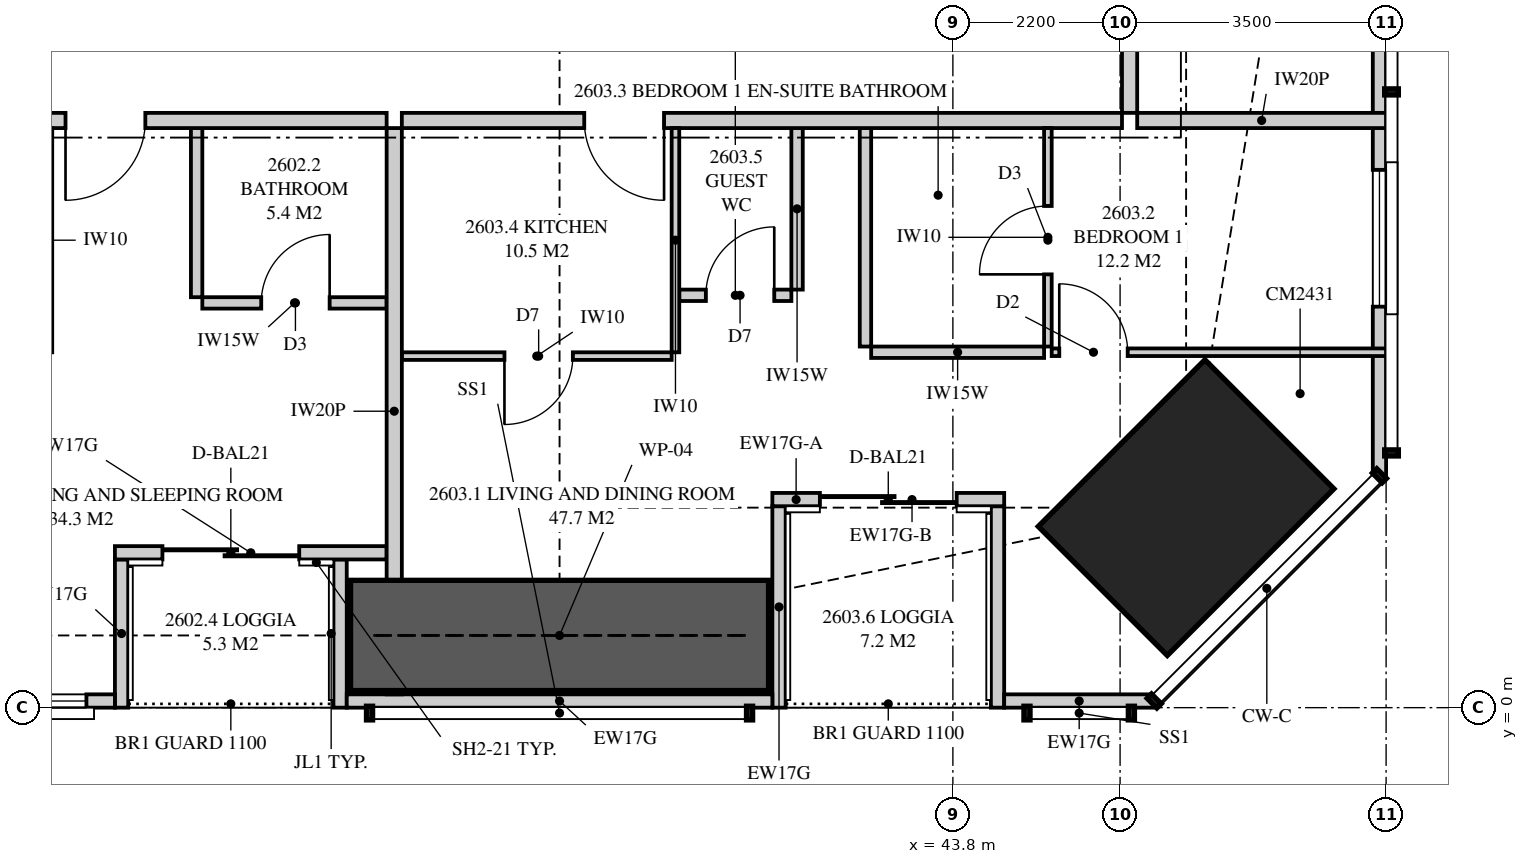
"""IFC4 building model, lengths in metres.
Left out: names, types, materials, properties, quantities, classifications, styles, units other than length and angle.
Written with IfcOpenShell. Run it as: python <this file> out.ifc"""

import sys

from ifc_helpers import new_model, si_unit, direction, frame, frame_2d, origin, origin_2d, place, context, subcontext, project, spatial, polyline, rectangle, outline, extrude, element, fill, save


model = new_model("IFC4")
c1 = context("Model", 3, precision=1e-05, world=origin(), true_north=direction((0.0, 1.0)))
c2 = subcontext(c1, "Body", "Model", "MODEL_VIEW")
j1 = project(units=[si_unit("LENGTHUNIT", "METRE"), si_unit("PLANEANGLEUNIT", "RADIAN")], contexts=[c1])
p1 = place(None, origin())
s1 = spatial("IfcSite", under=j1, at=p1, CompositionType="ELEMENT")
p2 = place(p1, origin())
s2 = spatial("IfcBuilding", under=s1, at=p2, CompositionType="ELEMENT")
p3 = place(p2, frame((0.0, 0.0, 98.15)))
s3 = spatial("IfcBuildingStorey", under=s2, at=p3, CompositionType="ELEMENT", Elevation=98.15)
p4 = place(p3, frame((46.869, 2.631, 0.0), z_axis=(0.0, 0.0, 1.0), x_axis=(-0.707106781187, 0.707106781187, 0.0)))
e1 = element("IfcColumn", 1, at=p4, inside=s3, PredefinedType="COLUMN", context=c2, shape_type="SweptSolid", body=[
    extrude(rectangle(XDim=2.4, YDim=3.1, at=origin_2d()), origin(), (0.0, 0.0, 1.0), 3.35),
])
p5 = place(p3, frame((24.875, 0.087, 0.0), z_axis=(0.0, 0.0, 1.0), x_axis=(1.0, 0.0, 0.0)))
e2 = element("IfcWall", 2, at=p5, inside=s3, PredefinedType="SOLIDWALL", context=c2, shape_type="SweptSolid", body=[
    extrude(rectangle(XDim=7.9, YDim=0.175, at=frame_2d((3.95, 0.0))), origin(), (0.0, 0.0, 1.0), 2.15),
])
p6 = place(p5, frame((5.725, 0.0, 0.4)))
e3 = element("IfcOpeningElement", 3, at=p6, cuts=e2, PredefinedType="OPENING", context=c2, shape_type="SweptSolid", body=[
    extrude(rectangle(XDim=1.8, YDim=1.7, at=frame_2d((0.9, 0.85))), frame((0.0, 0.097, 0.0), z_axis=(0.0, -1.0, 0.0), x_axis=(1.0, 0.0, 0.0)), (0.0, 0.0, 1.0), 0.195),
])
p7 = place(p3, frame((35.825, 0.087, 0.0), z_axis=(0.0, 0.0, 1.0), x_axis=(1.0, 0.0, 0.0)))
e4 = element("IfcWall", 4, at=p7, inside=s3, PredefinedType="SOLIDWALL", context=c2, shape_type="SweptSolid", body=[
    extrude(outline(polyline([(0.0, 0.0), (5.6, 0.0), (5.6, 3.11), (3.003, 3.11), (3.003, 2.15), (2.958, 2.15), (2.958, 3.11), (2.8, 3.11), (2.8, 2.15), (0.0, 2.15), (0.0, 0.0)])), frame((0.0, 0.087, 0.0), z_axis=(0.0, -1.0, 0.0), x_axis=(1.0, 0.0, 0.0)), (0.0, 0.0, 1.0), 0.175),
])
p8 = place(p3, frame((44.475, 0.087, 0.0), z_axis=(0.0, 0.0, 1.0), x_axis=(1.0, 0.0, 0.0)))
e5 = element("IfcWall", 5, at=p8, inside=s3, PredefinedType="SOLIDWALL", context=c2, shape_type="SweptSolid", body=[
    extrude(rectangle(XDim=1.974, YDim=0.175, at=frame_2d((0.987, 0.0))), origin(), (0.0, 0.0, 1.0), 3.11),
])
p9 = place(p3, frame((32.775, 2.038, 0.0), z_axis=(0.0, 0.0, 1.0), x_axis=(1.0, 0.0, 0.0)))
e6 = element("IfcWall", 6, at=p9, inside=s3, PredefinedType="SOLIDWALL", context=c2, shape_type="SweptSolid", body=[
    extrude(rectangle(XDim=3.575, YDim=0.175, at=frame_2d((1.788, 0.0))), origin(), (0.0, 0.0, 1.0), 3.11),
])
p10 = place(p9, frame((0.625, 0.0, 0.0)))
e7 = element("IfcOpeningElement", 7, at=p10, cuts=e6, PredefinedType="OPENING", context=c2, shape_type="SweptSolid", body=[
    extrude(rectangle(XDim=1.8, YDim=2.1, at=frame_2d((0.9, 1.05))), frame((0.0, 0.097, 0.0), z_axis=(0.0, -1.0, 0.0), x_axis=(1.0, 0.0, 0.0)), (0.0, 0.0, 1.0), 0.195),
])
for number, where, z_axis, x_axis in (
    (8, (32.863, 0.0, 0.0), (0.0, 0.0, 1.0), (0.0, 1.0, 0.0)),
    (9, (35.738, 0.0, 0.0), (0.0, 0.0, 1.0), (0.0, 1.0, 0.0)),
):
    element("IfcWall", number, at=place(p3, frame(where, z_axis=z_axis, x_axis=x_axis)), inside=s3, PredefinedType="SOLIDWALL", context=c2, shape_type="SweptSolid", body=[
        extrude(outline(polyline([(0.0, 0.0), (1.95, 0.0), (1.95, 3.11), (1.75, 3.11), (1.75, 2.15), (0.15, 2.15), (0.15, 3.11), (0.0, 3.11), (0.0, 0.0)])), frame((0.0, 0.087, 0.0), z_axis=(0.0, -1.0, 0.0), x_axis=(1.0, 0.0, 0.0)), (0.0, 0.0, 1.0), 0.175),
    ])
p11 = place(p3, frame((41.425, 2.738, 0.0), z_axis=(0.0, 0.0, 1.0), x_axis=(1.0, 0.0, 0.0)))
e10 = element("IfcWall", 10, at=p11, inside=s3, PredefinedType="SOLIDWALL", context=c2, shape_type="SweptSolid", body=[
    extrude(rectangle(XDim=0.625, YDim=0.175, at=frame_2d((0.312, 0.0))), origin(), (0.0, 0.0, 1.0), 2.51),
])
p12 = place(p3, frame((42.05, 2.738, 0.0), z_axis=(0.0, 0.0, 1.0), x_axis=(1.0, 0.0, 0.0)))
e11 = element("IfcWall", 11, at=p12, inside=s3, PredefinedType="SOLIDWALL", context=c2, shape_type="SweptSolid", body=[
    extrude(rectangle(XDim=2.425, YDim=0.175, at=frame_2d((1.212, 0.0))), origin(), (0.0, 0.0, 1.0), 2.15),
])
p13 = place(p12, origin())
e12 = element("IfcOpeningElement", 12, at=p13, cuts=e11, PredefinedType="OPENING", context=c2, shape_type="SweptSolid", body=[
    extrude(rectangle(XDim=1.8, YDim=2.1, at=frame_2d((0.9, 1.05))), frame((0.0, 0.097, 0.0), z_axis=(0.0, -1.0, 0.0), x_axis=(1.0, 0.0, 0.0)), (0.0, 0.0, 1.0), 0.195),
])
p14 = place(p3, frame((41.512, 0.0, 0.0), z_axis=(0.0, 0.0, 1.0), x_axis=(0.0, 1.0, 0.0)))
e13 = element("IfcWall", 13, at=p14, inside=s3, PredefinedType="SOLIDWALL", context=c2, shape_type="SweptSolid", body=[
    extrude(outline(polyline([(0.0, 0.0), (2.65, 0.0), (2.65, 2.51), (2.373, 2.51), (2.373, 2.15), (0.705, 2.15), (0.705, 3.11), (0.0, 3.11), (0.0, 0.0)])), frame((0.0, 0.087, 0.0), z_axis=(0.0, -1.0, 0.0), x_axis=(1.0, 0.0, 0.0)), (0.0, 0.0, 1.0), 0.175),
])
p15 = place(p3, frame((44.387, 0.0, 0.0), z_axis=(0.0, 0.0, 1.0), x_axis=(0.0, 1.0, 0.0)))
e14 = element("IfcWall", 14, at=p15, inside=s3, PredefinedType="SOLIDWALL", context=c2, shape_type="SweptSolid", body=[
    extrude(outline(polyline([(0.0, 0.0), (2.65, 0.0), (2.65, 2.15), (1.291, 2.15), (1.291, 3.11), (0.0, 3.11), (0.0, 0.0)])), frame((0.0, 0.087, 0.0), z_axis=(0.0, -1.0, 0.0), x_axis=(1.0, 0.0, 0.0)), (0.0, 0.0, 1.0), 0.175),
])
p16 = place(p3, frame((49.413, 3.051, 0.0), z_axis=(0.0, 0.0, 1.0), x_axis=(0.0, 1.0, 0.0)))
e15 = element("IfcWall", 15, at=p16, inside=s3, PredefinedType="SOLIDWALL", context=c2, shape_type="SweptSolid", body=[
    extrude(outline(polyline([(0.0, 0.0), (31.897, 0.0), (31.897, 3.11), (22.167, 3.11), (22.167, 2.15), (22.074, 2.15), (22.074, 3.11), (21.949, 3.11), (21.949, 2.15), (9.949, 2.15), (9.949, 3.11), (9.823, 3.11), (9.823, 2.15), (9.73, 2.15), (9.73, 3.11), (0.0, 3.11), (0.0, 0.0)])), frame((0.0, 0.087, 0.0), z_axis=(0.0, -1.0, 0.0), x_axis=(1.0, 0.0, 0.0)), (0.0, 0.0, 1.0), 0.175),
])
p17 = place(p16, frame((2.224, 0.0, 0.4)))
e16 = element("IfcOpeningElement", 16, at=p17, cuts=e15, PredefinedType="OPENING", context=c2, shape_type="SweptSolid", body=[
    extrude(rectangle(XDim=1.8, YDim=1.7, at=frame_2d((0.9, 0.85))), frame((0.0, 0.097, 0.0), z_axis=(0.0, -1.0, 0.0), x_axis=(1.0, 0.0, 0.0)), (0.0, 0.0, 1.0), 0.195),
])
p18 = place(p16, frame((14.849, 0.0, 0.4)))
e17 = element("IfcOpeningElement", 17, at=p18, cuts=e15, PredefinedType="OPENING", context=c2, shape_type="SweptSolid", body=[
    extrude(rectangle(XDim=1.2, YDim=1.7, at=frame_2d((0.6, 0.85))), frame((0.0, 0.097, 0.0), z_axis=(0.0, -1.0, 0.0), x_axis=(1.0, 0.0, 0.0)), (0.0, 0.0, 1.0), 0.195),
])
p19 = place(p16, frame((27.373, 0.0, 0.4)))
e18 = element("IfcOpeningElement", 18, at=p19, cuts=e15, PredefinedType="OPENING", context=c2, shape_type="SweptSolid", body=[
    extrude(rectangle(XDim=1.8, YDim=1.7, at=frame_2d((0.9, 0.85))), frame((0.0, 0.097, 0.0), z_axis=(0.0, -1.0, 0.0), x_axis=(1.0, 0.0, 0.0)), (0.0, 0.0, 1.0), 0.195),
])
p20 = place(p3, frame((36.45, 0.175, 0.0), z_axis=(0.0, 0.0, 1.0), x_axis=(0.0, 1.0, 0.0)))
e19 = element("IfcWall", 19, at=p20, inside=s3, PredefinedType="PARTITIONING", context=c2, shape_type="SweptSolid", body=[
    extrude(outline(polyline([(0.529, 2.15), (0.0, 2.15), (0.0, 0.0), (0.529, 0.0), (0.529, 0.017), (1.021, 0.017), (1.021, 0.0), (7.45, 0.0), (7.45, 3.11), (1.685, 3.11), (1.685, 2.15), (1.021, 2.15), (1.021, 2.133), (0.529, 2.133), (0.529, 2.15)])), frame((0.0, 0.1, 0.0), z_axis=(0.0, -1.0, 0.0), x_axis=(1.0, 0.0, 0.0)), (0.0, 0.0, 1.0), 0.2),
])
p21 = place(p3, frame((28.9, 7.725, 0.0), z_axis=(0.0, 0.0, 1.0), x_axis=(1.0, 0.0, 0.0)))
e20 = element("IfcWall", 20, at=p21, inside=s3, PredefinedType="PARTITIONING", context=c2, shape_type="SweptSolid", body=[
    extrude(rectangle(XDim=7.45, YDim=0.2, at=frame_2d((3.725, 0.0))), origin(), (0.0, 0.0, 1.0), 3.11),
])
p22 = place(p21, frame((3.225, 0.0, 0.0)))
e21 = element("IfcOpeningElement", 21, at=p22, cuts=e20, PredefinedType="OPENING", context=c2, shape_type="SweptSolid", body=[
    extrude(rectangle(XDim=1.05, YDim=2.2, at=frame_2d((0.525, 1.1))), frame((0.0, 0.11, 0.0), z_axis=(0.0, -1.0, 0.0), x_axis=(1.0, 0.0, 0.0)), (0.0, 0.0, 1.0), 0.22),
])
p23 = place(p3, frame((33.925, 5.325, 0.0), z_axis=(0.0, 0.0, 1.0), x_axis=(1.0, 0.0, 0.0)))
e22 = element("IfcWall", 22, at=p23, inside=s3, PredefinedType="PLUMBINGWALL", context=c2, shape_type="SweptSolid", body=[
    extrude(rectangle(XDim=2.425, YDim=0.15, at=frame_2d((1.212, 0.0))), origin(), (0.0, 0.0, 1.0), 3.11),
])
p24 = place(p23, frame((0.775, 0.0, 0.0)))
e23 = element("IfcOpeningElement", 23, at=p24, cuts=e22, PredefinedType="OPENING", context=c2, shape_type="SweptSolid", body=[
    extrude(rectangle(XDim=0.9, YDim=2.1, at=frame_2d((0.45, 1.05))), frame((0.0, 0.085, 0.0), z_axis=(0.0, -1.0, 0.0), x_axis=(1.0, 0.0, 0.0)), (0.0, 0.0, 1.0), 0.17),
])
p25 = place(p3, frame((33.85, 5.4, 0.0), z_axis=(0.0, 0.0, 1.0), x_axis=(0.0, 1.0, 0.0)))
e24 = element("IfcWall", 24, at=p25, inside=s3, PredefinedType="PLUMBINGWALL", context=c2, shape_type="SweptSolid", body=[
    extrude(rectangle(XDim=2.225, YDim=0.15, at=frame_2d((1.113, 0.0))), origin(), (0.0, 0.0, 1.0), 3.11),
])
p26 = place(p3, frame((36.55, 7.725, 0.0), z_axis=(0.0, 0.0, 1.0), x_axis=(1.0, 0.0, 0.0)))
e25 = element("IfcWall", 25, at=p26, inside=s3, PredefinedType="PARTITIONING", context=c2, shape_type="SweptSolid", body=[
    extrude(outline(polyline([(0.0, 0.0), (9.475, 0.0), (9.475, 3.11), (2.412, 3.11), (2.412, 2.541), (1.738, 2.541), (1.738, 3.11), (0.0, 3.11), (0.0, 0.0)])), frame((0.0, 0.1, 0.0), z_axis=(0.0, -1.0, 0.0), x_axis=(1.0, 0.0, 0.0)), (0.0, 0.0, 1.0), 0.2),
])
p27 = place(p26, frame((2.4, 0.0, 0.0)))
e26 = element("IfcOpeningElement", 26, at=p27, cuts=e25, PredefinedType="OPENING", context=c2, shape_type="SweptSolid", body=[
    extrude(rectangle(XDim=1.05, YDim=2.2, at=frame_2d((0.525, 1.1))), frame((0.0, 0.11, 0.0), z_axis=(0.0, -1.0, 0.0), x_axis=(1.0, 0.0, 0.0)), (0.0, 0.0, 1.0), 0.22),
])
p28 = place(p3, frame((45.05, 4.751, 0.0), z_axis=(0.0, 0.0, 1.0), x_axis=(0.0, 1.0, 0.0)))
e27 = element("IfcWall", 27, at=p28, inside=s3, PredefinedType="PARTITIONING", context=c2, shape_type="SweptSolid", body=[
    extrude(rectangle(XDim=2.874, YDim=0.1, at=frame_2d((1.437, 0.0))), origin(), (0.0, 0.0, 1.0), 3.11),
])
p29 = place(p28, frame((0.949, 0.0, 0.0)))
e28 = element("IfcOpeningElement", 28, at=p29, cuts=e27, PredefinedType="OPENING", context=c2, shape_type="SweptSolid", body=[
    extrude(rectangle(XDim=0.9, YDim=2.1, at=frame_2d((0.45, 1.05))), frame((0.0, 0.06, 0.0), z_axis=(0.0, -1.0, 0.0), x_axis=(1.0, 0.0, 0.0)), (0.0, 0.0, 1.0), 0.12),
])
p30 = place(p3, frame((45.1, 4.676, 0.0), z_axis=(0.0, 0.0, 1.0), x_axis=(1.0, 0.0, 0.0)))
e29 = element("IfcWall", 29, at=p30, inside=s3, PredefinedType="PARTITIONING", context=c2, shape_type="SweptSolid", body=[
    extrude(outline(polyline([(0.0, 0.0), (4.4, 0.0), (4.4, 3.11), (2.971, 3.11), (2.971, 2.15), (1.229, 2.15), (1.229, 3.11), (0.0, 3.11), (0.0, 0.0)])), frame((0.0, 0.05, 0.0), z_axis=(0.0, -1.0, 0.0), x_axis=(1.0, 0.0, 0.0)), (0.0, 0.0, 1.0), 0.1),
])
p31 = place(p30, frame((0.1, 0.0, 0.0)))
e30 = element("IfcOpeningElement", 30, at=p31, cuts=e29, PredefinedType="OPENING", context=c2, shape_type="SweptSolid", body=[
    extrude(rectangle(XDim=0.9, YDim=2.1, at=frame_2d((0.45, 1.05))), frame((0.0, 0.06, 0.0), z_axis=(0.0, -1.0, 0.0), x_axis=(1.0, 0.0, 0.0)), (0.0, 0.0, 1.0), 0.12),
])
p32 = place(p3, frame((42.725, 4.676, 0.0), z_axis=(0.0, 0.0, 1.0), x_axis=(1.0, 0.0, 0.0)))
e31 = element("IfcWall", 31, at=p32, inside=s3, PredefinedType="PLUMBINGWALL", context=c2, shape_type="SweptSolid", body=[
    extrude(rectangle(XDim=2.275, YDim=0.15, at=frame_2d((1.137, 0.0))), origin(), (0.0, 0.0, 1.0), 3.11),
])
p33 = place(p3, frame((42.65, 4.751, 0.0), z_axis=(0.0, 0.0, 1.0), x_axis=(0.0, 1.0, 0.0)))
e32 = element("IfcWall", 32, at=p33, inside=s3, PredefinedType="PLUMBINGWALL", context=c2, shape_type="SweptSolid", body=[
    extrude(rectangle(XDim=2.874, YDim=0.15, at=frame_2d((1.437, 0.0))), origin(), (0.0, 0.0, 1.0), 3.11),
])
p34 = place(p3, frame((36.55, 4.625, 0.0), z_axis=(0.0, 0.0, 1.0), x_axis=(1.0, 0.0, 0.0)))
e33 = element("IfcWall", 33, at=p34, inside=s3, PredefinedType="PARTITIONING", context=c2, shape_type="SweptSolid", body=[
    extrude(outline(polyline([(0.0, 0.0), (3.55, 0.0), (3.55, 3.11), (2.362, 3.11), (2.362, 2.541), (1.788, 2.541), (1.788, 3.11), (0.0, 3.11), (0.0, 0.0)])), frame((0.0, 0.05, 0.0), z_axis=(0.0, -1.0, 0.0), x_axis=(1.0, 0.0, 0.0)), (0.0, 0.0, 1.0), 0.1),
])
p35 = place(p34, frame((1.35, 0.0, 0.0)))
e34 = element("IfcOpeningElement", 34, at=p35, cuts=e33, PredefinedType="OPENING", context=c2, shape_type="SweptSolid", body=[
    extrude(rectangle(XDim=0.9, YDim=2.1, at=frame_2d((0.45, 1.05))), frame((0.0, 0.06, 0.0), z_axis=(0.0, -1.0, 0.0), x_axis=(1.0, 0.0, 0.0)), (0.0, 0.0, 1.0), 0.12),
])
p36 = place(p3, frame((40.15, 4.675, 0.0), z_axis=(0.0, 0.0, 1.0), x_axis=(0.0, 1.0, 0.0)))
e35 = element("IfcWall", 35, at=p36, inside=s3, PredefinedType="PARTITIONING", context=c2, shape_type="SweptSolid", body=[
    extrude(rectangle(XDim=2.95, YDim=0.1, at=frame_2d((1.475, 0.0))), origin(), (0.0, 0.0, 1.0), 3.11),
])
p37 = place(p3, frame((40.2, 5.425, 0.0), z_axis=(0.0, 0.0, 1.0), x_axis=(1.0, 0.0, 0.0)))
e36 = element("IfcWall", 36, at=p37, inside=s3, PredefinedType="PLUMBINGWALL", context=c2, shape_type="SweptSolid", body=[
    extrude(rectangle(XDim=1.475, YDim=0.15, at=frame_2d((0.738, 0.0))), origin(), (0.0, 0.0, 1.0), 3.11),
])
p38 = place(p37, frame((0.35, 0.0, 0.0)))
e37 = element("IfcOpeningElement", 37, at=p38, cuts=e36, PredefinedType="OPENING", context=c2, shape_type="SweptSolid", body=[
    extrude(rectangle(XDim=0.9, YDim=2.1, at=frame_2d((0.45, 1.05))), frame((0.0, 0.085, 0.0), z_axis=(0.0, -1.0, 0.0), x_axis=(1.0, 0.0, 0.0)), (0.0, 0.0, 1.0), 0.17),
])
p39 = place(p3, frame((41.75, 5.5, 0.0), z_axis=(0.0, 0.0, 1.0), x_axis=(0.0, 1.0, 0.0)))
e38 = element("IfcWall", 38, at=p39, inside=s3, PredefinedType="PLUMBINGWALL", context=c2, shape_type="SweptSolid", body=[
    extrude(rectangle(XDim=2.125, YDim=0.15, at=frame_2d((1.062, 0.0))), origin(), (0.0, 0.0, 1.0), 3.11),
])
p40 = place(p3, frame((46.225, 7.725, 0.0), z_axis=(0.0, 0.0, 1.0), x_axis=(1.0, 0.0, 0.0)))
e39 = element("IfcWall", 39, at=p40, inside=s3, PredefinedType="PARTITIONING", context=c2, shape_type="SweptSolid", body=[
    extrude(outline(polyline([(0.0, 0.0), (3.275, 0.0), (3.275, 3.11), (2.392, 3.11), (2.392, 2.15), (0.643, 2.15), (0.643, 2.541), (0.306, 2.541), (0.306, 3.11), (0.0, 3.11), (0.0, 0.0)])), frame((0.0, 0.1, 0.0), z_axis=(0.0, -1.0, 0.0), x_axis=(1.0, 0.0, 0.0)), (0.0, 0.0, 1.0), 0.2),
])
p41 = place(p3, frame((46.125, 7.825, 0.0), z_axis=(0.0, 0.0, 1.0), x_axis=(0.0, 1.0, 0.0)))
e40 = element("IfcWall", 40, at=p41, inside=s3, PredefinedType="PARTITIONING", context=c2, shape_type="SweptSolid", body=[
    extrude(outline(polyline([(0.0, 0.0), (8.475, 0.0), (8.475, 3.11), (5.512, 3.11), (5.512, 2.541), (4.838, 2.541), (4.838, 3.11), (0.0, 3.11), (0.0, 0.0)])), frame((0.0, 0.1, 0.0), z_axis=(0.0, -1.0, 0.0), x_axis=(1.0, 0.0, 0.0)), (0.0, 0.0, 1.0), 0.2),
])
p42 = place(p3, frame((35.875, 0.95, 0.0), z_axis=(0.0, 0.0, 1.0), x_axis=(1.0, 0.0, 0.0)))
e41 = element("IfcWall", 41, at=p42, inside=s3, PredefinedType="SHEAR", context=c2, shape_type="SweptSolid", body=[
    extrude(rectangle(XDim=5.5, YDim=1.45, at=frame_2d((2.75, 0.0))), origin(), (0.0, 0.0, 1.0), 3.35),
])
p43 = place(p10, origin())
e42 = element("IfcDoor", 42, at=p43, inside=s3, OperationType="SLIDING_TO_LEFT", PredefinedType="DOOR", context=c2, shape_type="SweptSolid", body=[
    extrude(rectangle(XDim=1.8, YDim=2.1, at=frame_2d((0.9, 1.05))), frame((0.0, 0.025, 0.0), z_axis=(0.0, -1.0, 0.0), x_axis=(1.0, 0.0, 0.0)), (0.0, 0.0, 1.0), 0.05),
])
fill(e7, e42)
p44 = place(p6, origin())
e43 = element("IfcWindow", 43, at=p44, inside=s3, PartitioningType="SINGLE_PANEL", PredefinedType="WINDOW", context=c2, shape_type="SweptSolid", body=[
    extrude(rectangle(XDim=1.8, YDim=1.7, at=frame_2d((0.9, 0.85))), frame((0.0, 0.03, 0.0), z_axis=(0.0, -1.0, 0.0), x_axis=(1.0, 0.0, 0.0)), (0.0, 0.0, 1.0), 0.06),
])
fill(e3, e43)
p45 = place(p13, origin())
e44 = element("IfcDoor", 44, at=p45, inside=s3, OperationType="SLIDING_TO_LEFT", PredefinedType="DOOR", context=c2, shape_type="SweptSolid", body=[
    extrude(rectangle(XDim=1.8, YDim=2.1, at=frame_2d((0.9, 1.05))), frame((0.0, 0.025, 0.0), z_axis=(0.0, -1.0, 0.0), x_axis=(1.0, 0.0, 0.0)), (0.0, 0.0, 1.0), 0.05),
])
fill(e12, e44)
p46 = place(p17, origin())
e45 = element("IfcWindow", 45, at=p46, inside=s3, PartitioningType="SINGLE_PANEL", PredefinedType="WINDOW", context=c2, shape_type="SweptSolid", body=[
    extrude(rectangle(XDim=1.8, YDim=1.7, at=frame_2d((0.9, 0.85))), frame((0.0, 0.03, 0.0), z_axis=(0.0, -1.0, 0.0), x_axis=(1.0, 0.0, 0.0)), (0.0, 0.0, 1.0), 0.06),
])
fill(e16, e45)
p47 = place(p22, frame((1.05, 0.0, 0.0), z_axis=(0.0, 0.0, 1.0), x_axis=(-1.0, 0.0, 0.0)))
e46 = element("IfcDoor", 46, at=p47, inside=s3, OperationType="SINGLE_SWING_RIGHT", PredefinedType="DOOR", context=c2, shape_type="SweptSolid", body=[
    extrude(rectangle(XDim=1.05, YDim=2.2, at=frame_2d((0.525, 1.1))), frame((0.0, 0.025, 0.0), z_axis=(0.0, -1.0, 0.0), x_axis=(1.0, 0.0, 0.0)), (0.0, 0.0, 1.0), 0.05),
])
fill(e21, e46)
p48 = place(p24, origin())
e47 = element("IfcDoor", 47, at=p48, inside=s3, OperationType="SINGLE_SWING_RIGHT", PredefinedType="DOOR", context=c2, shape_type="SweptSolid", body=[
    extrude(rectangle(XDim=0.9, YDim=2.1, at=frame_2d((0.45, 1.05))), frame((0.0, 0.025, 0.0), z_axis=(0.0, -1.0, 0.0), x_axis=(1.0, 0.0, 0.0)), (0.0, 0.0, 1.0), 0.05),
])
fill(e23, e47)
p49 = place(p27, frame((1.05, 0.0, 0.0), z_axis=(0.0, 0.0, 1.0), x_axis=(-1.0, 0.0, 0.0)))
e48 = element("IfcDoor", 48, at=p49, inside=s3, OperationType="SINGLE_SWING_LEFT", PredefinedType="DOOR", context=c2, shape_type="SweptSolid", body=[
    extrude(rectangle(XDim=1.05, YDim=2.2, at=frame_2d((0.525, 1.1))), frame((0.0, 0.025, 0.0), z_axis=(0.0, -1.0, 0.0), x_axis=(1.0, 0.0, 0.0)), (0.0, 0.0, 1.0), 0.05),
])
fill(e26, e48)
p50 = place(p31, origin())
e49 = element("IfcDoor", 49, at=p50, inside=s3, OperationType="SINGLE_SWING_LEFT", PredefinedType="DOOR", context=c2, shape_type="SweptSolid", body=[
    extrude(rectangle(XDim=0.9, YDim=2.1, at=frame_2d((0.45, 1.05))), frame((0.0, 0.025, 0.0), z_axis=(0.0, -1.0, 0.0), x_axis=(1.0, 0.0, 0.0)), (0.0, 0.0, 1.0), 0.05),
])
fill(e30, e49)
p51 = place(p29, origin())
e50 = element("IfcDoor", 50, at=p51, inside=s3, OperationType="SINGLE_SWING_LEFT", PredefinedType="DOOR", context=c2, shape_type="SweptSolid", body=[
    extrude(rectangle(XDim=0.9, YDim=2.1, at=frame_2d((0.45, 1.05))), frame((0.0, 0.025, 0.0), z_axis=(0.0, -1.0, 0.0), x_axis=(1.0, 0.0, 0.0)), (0.0, 0.0, 1.0), 0.05),
])
fill(e28, e50)
p52 = place(p35, frame((0.9, 0.0, 0.0), z_axis=(0.0, 0.0, 1.0), x_axis=(-1.0, 0.0, 0.0)))
e51 = element("IfcDoor", 51, at=p52, inside=s3, OperationType="SINGLE_SWING_RIGHT", PredefinedType="DOOR", context=c2, shape_type="SweptSolid", body=[
    extrude(rectangle(XDim=0.9, YDim=2.1, at=frame_2d((0.45, 1.05))), frame((0.0, 0.025, 0.0), z_axis=(0.0, -1.0, 0.0), x_axis=(1.0, 0.0, 0.0)), (0.0, 0.0, 1.0), 0.05),
])
fill(e34, e51)
p53 = place(p38, origin())
e52 = element("IfcDoor", 52, at=p53, inside=s3, OperationType="SINGLE_SWING_RIGHT", PredefinedType="DOOR", context=c2, shape_type="SweptSolid", body=[
    extrude(rectangle(XDim=0.9, YDim=2.1, at=frame_2d((0.45, 1.05))), frame((0.0, 0.025, 0.0), z_axis=(0.0, -1.0, 0.0), x_axis=(1.0, 0.0, 0.0)), (0.0, 0.0, 1.0), 0.05),
])
fill(e37, e52)
save(model, sys.argv[1])
